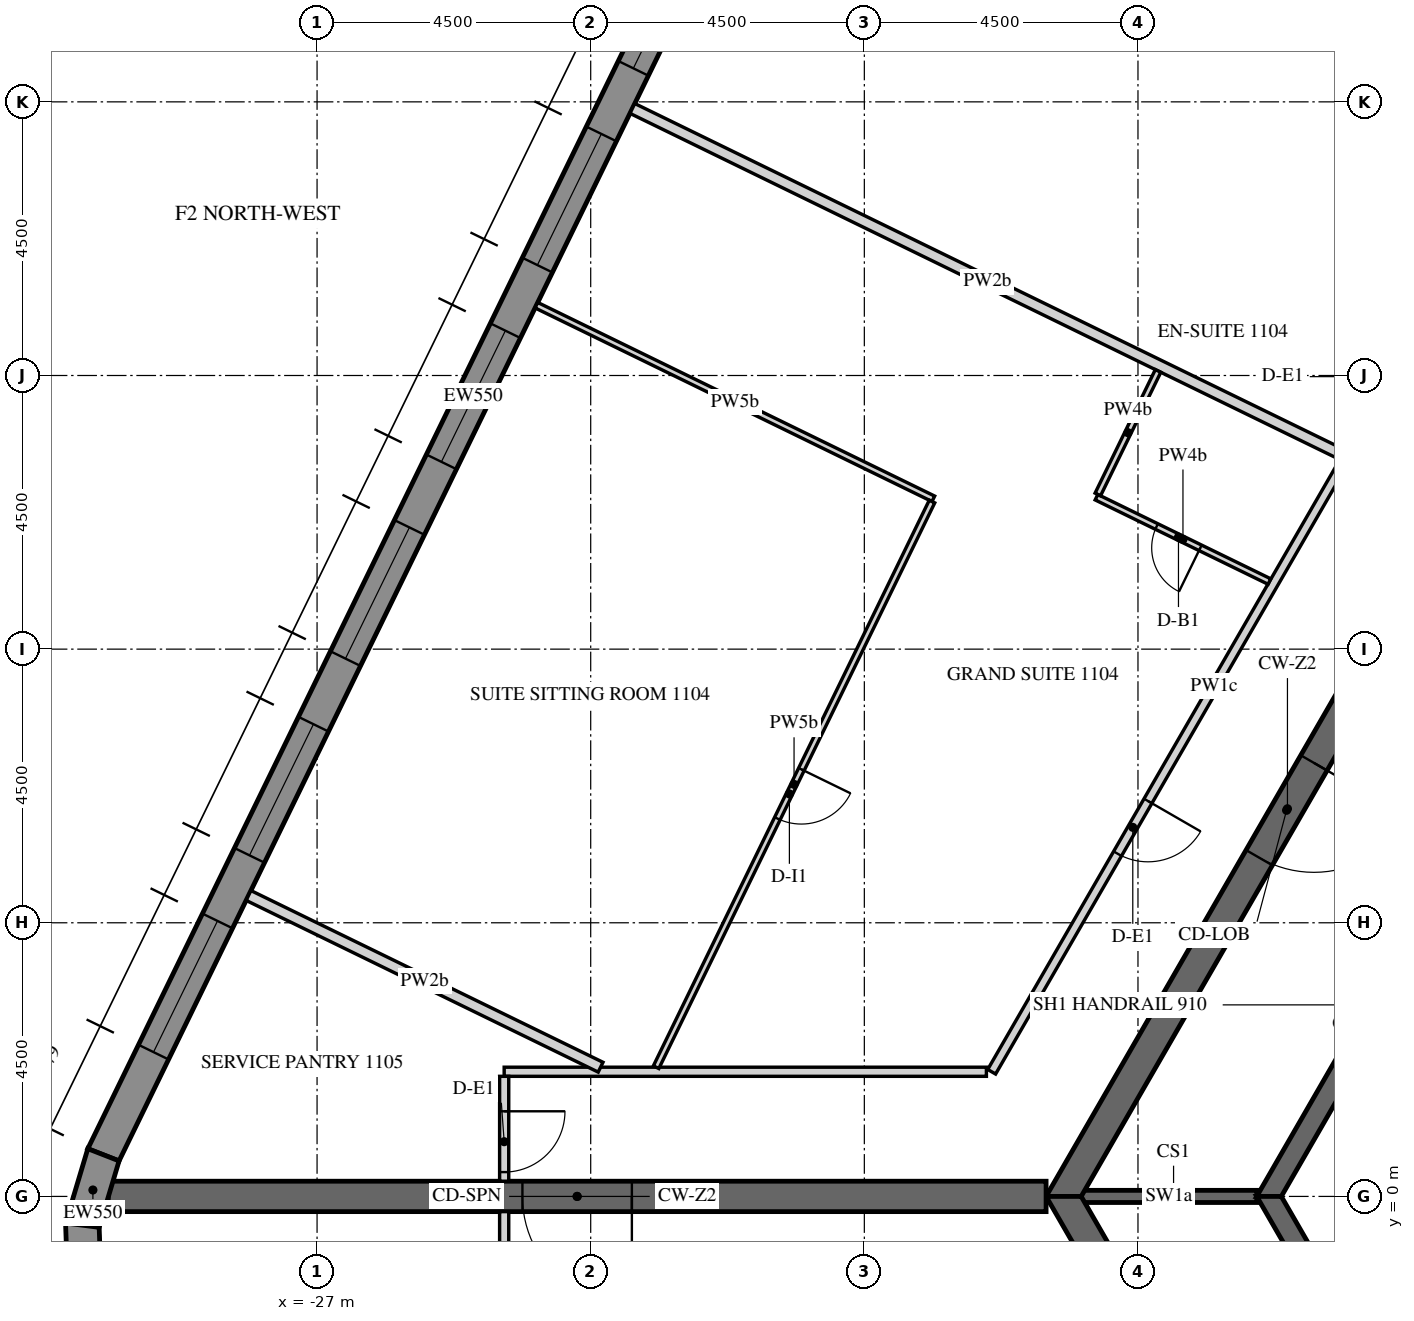
"""IFC4 building model, lengths in metres.
Left out: names, types, materials, properties, quantities, classifications, styles, units other than length and angle.
Written with IfcOpenShell. Run it as: python <this file> out.ifc"""

import sys

from ifc_helpers import new_model, si_unit, direction, frame, frame_2d, origin, place, context, subcontext, project, spatial, polyline, rectangle, outline, extrude, element, fill, save


model = new_model("IFC4")
c1 = context("Model", 3, precision=1e-05, world=origin(), true_north=direction((0.0, 1.0)))
c2 = subcontext(c1, "Body", "Model", "MODEL_VIEW")
j1 = project(units=[si_unit("LENGTHUNIT", "METRE"), si_unit("PLANEANGLEUNIT", "RADIAN")], contexts=[c1])
p1 = place(None, origin())
s1 = spatial("IfcSite", under=j1, at=p1, CompositionType="ELEMENT")
p2 = place(p1, origin())
s2 = spatial("IfcBuilding", under=s1, at=p2, CompositionType="ELEMENT")
p3 = place(p2, frame((0.0, 0.0, 156.6)))
s3 = spatial("IfcBuildingStorey", under=s2, at=p3, CompositionType="ELEMENT", Elevation=156.6)
p4 = place(p3, frame((-18.345, 25.633, -0.15), z_axis=(0.0, 0.0, 1.0), x_axis=(-0.43837181828, -0.898793718791, 0.0)))
e1 = element("IfcWall", 1, at=p4, inside=s3, PredefinedType="SOLIDWALL", context=c2, shape_type="SweptSolid", body=[
    extrude(outline(polyline([(-0.026, -0.275), (27.78, -0.275), (27.735, 0.275), (0.026, 0.275), (-0.026, -0.275)])), origin(), (0.0, 0.0, 1.0), 3.9),
])
p5 = place(p4, frame((1.879, 0.0, 1.05)))
e2 = element("IfcOpeningElement", 2, at=p5, cuts=e1, PredefinedType="OPENING", context=c2, shape_type="SweptSolid", body=[
    extrude(rectangle(XDim=2.4, YDim=2.4, at=frame_2d((1.2, 1.2))), frame((0.0, 0.285, 0.0), z_axis=(0.0, -1.0, 0.0), x_axis=(1.0, 0.0, 0.0)), (0.0, 0.0, 1.0), 0.57),
])
p6 = place(p4, frame((5.479, 0.0, 1.05)))
e3 = element("IfcOpeningElement", 3, at=p6, cuts=e1, PredefinedType="OPENING", context=c2, shape_type="SweptSolid", body=[
    extrude(rectangle(XDim=2.4, YDim=2.4, at=frame_2d((1.2, 1.2))), frame((0.0, 0.285, 0.0), z_axis=(0.0, -1.0, 0.0), x_axis=(1.0, 0.0, 0.0)), (0.0, 0.0, 1.0), 0.57),
])
p7 = place(p4, frame((9.079, 0.0, 1.05)))
e4 = element("IfcOpeningElement", 4, at=p7, cuts=e1, PredefinedType="OPENING", context=c2, shape_type="SweptSolid", body=[
    extrude(rectangle(XDim=2.4, YDim=2.4, at=frame_2d((1.2, 1.2))), frame((0.0, 0.285, 0.0), z_axis=(0.0, -1.0, 0.0), x_axis=(1.0, 0.0, 0.0)), (0.0, 0.0, 1.0), 0.57),
])
p8 = place(p4, frame((12.679, 0.0, 1.05)))
e5 = element("IfcOpeningElement", 5, at=p8, cuts=e1, PredefinedType="OPENING", context=c2, shape_type="SweptSolid", body=[
    extrude(rectangle(XDim=2.4, YDim=2.4, at=frame_2d((1.2, 1.2))), frame((0.0, 0.285, 0.0), z_axis=(0.0, -1.0, 0.0), x_axis=(1.0, 0.0, 0.0)), (0.0, 0.0, 1.0), 0.57),
])
p9 = place(p4, frame((16.279, 0.0, 1.05)))
e6 = element("IfcOpeningElement", 6, at=p9, cuts=e1, PredefinedType="OPENING", context=c2, shape_type="SweptSolid", body=[
    extrude(rectangle(XDim=2.4, YDim=2.4, at=frame_2d((1.2, 1.2))), frame((0.0, 0.285, 0.0), z_axis=(0.0, -1.0, 0.0), x_axis=(1.0, 0.0, 0.0)), (0.0, 0.0, 1.0), 0.57),
])
p10 = place(p4, frame((19.879, 0.0, 1.05)))
e7 = element("IfcOpeningElement", 7, at=p10, cuts=e1, PredefinedType="OPENING", context=c2, shape_type="SweptSolid", body=[
    extrude(rectangle(XDim=2.4, YDim=2.4, at=frame_2d((1.2, 1.2))), frame((0.0, 0.285, 0.0), z_axis=(0.0, -1.0, 0.0), x_axis=(1.0, 0.0, 0.0)), (0.0, 0.0, 1.0), 0.57),
])
p11 = place(p4, frame((23.479, 0.0, 1.05)))
e8 = element("IfcOpeningElement", 8, at=p11, cuts=e1, PredefinedType="OPENING", context=c2, shape_type="SweptSolid", body=[
    extrude(rectangle(XDim=2.4, YDim=2.4, at=frame_2d((1.2, 1.2))), frame((0.0, 0.285, 0.0), z_axis=(0.0, -1.0, 0.0), x_axis=(1.0, 0.0, 0.0)), (0.0, 0.0, 1.0), 0.57),
])
p12 = place(p3, frame((-30.513, 0.684, -0.15), z_axis=(0.0, 0.0, 1.0), x_axis=(-0.286736058109, -0.958009620505, 0.0)))
e9 = element("IfcWall", 9, at=p12, inside=s3, PredefinedType="SOLIDWALL", context=c2, shape_type="SweptSolid", body=[
    extrude(outline(polyline([(-0.022, -0.275), (1.253, -0.275), (1.163, 0.275), (0.022, 0.275), (-0.022, -0.275)])), origin(), (0.0, 0.0, 1.0), 3.9),
])
p13 = place(p3, frame((-30.86, -0.473, -0.15), z_axis=(0.0, 0.0, 1.0), x_axis=(0.03495638276, -0.999388838893, 0.0)))
e10 = element("IfcWall", 10, at=p13, inside=s3, PredefinedType="SOLIDWALL", context=c2, shape_type="SweptSolid", body=[
    extrude(outline(polyline([(-0.045, -0.275), (1.253, -0.275), (1.163, 0.275), (0.045, 0.275), (-0.045, -0.275)])), origin(), (0.0, 0.0, 1.0), 3.9),
])
p14 = place(p3, frame((-7.361, 12.75, -0.15), z_axis=(0.0, 0.0, 1.0), x_axis=(-0.50000571537, -0.866022103989, 0.0)))
e11 = element("IfcWall", 11, at=p14, inside=s3, PredefinedType="SHEAR", context=c2, shape_type="SweptSolid", body=[
    extrude(outline(polyline([(-0.144, -0.25), (14.867, -0.25), (14.578, 0.25), (0.144, 0.25), (-0.144, -0.25)])), origin(), (0.0, 0.0, 1.0), 3.9),
])
p15 = place(p14, frame((6.49, 0.0, 0.15)))
e12 = element("IfcOpeningElement", 12, at=p15, cuts=e11, PredefinedType="OPENING", context=c2, shape_type="SweptSolid", body=[
    extrude(rectangle(XDim=1.8, YDim=2.4, at=frame_2d((0.9, 1.2))), frame((0.0, 0.26, 0.0), z_axis=(0.0, -1.0, 0.0), x_axis=(1.0, 0.0, 0.0)), (0.0, 0.0, 1.0), 0.52),
])
p16 = place(p3, frame((-14.722, 0.0, -0.15), z_axis=(0.0, 0.0, 1.0), x_axis=(0.50000571537, -0.866022103989, 0.0)))
e13 = element("IfcWall", 13, at=p16, inside=s3, PredefinedType="SHEAR", context=c2, shape_type="SweptSolid", body=[
    extrude(outline(polyline([(-0.144, -0.25), (14.867, -0.25), (14.578, 0.25), (0.144, 0.25), (-0.144, -0.25)])), origin(), (0.0, 0.0, 1.0), 3.9),
])
p17 = place(p16, frame((6.432, 0.0, 0.15)))
e14 = element("IfcOpeningElement", 14, at=p17, cuts=e13, PredefinedType="OPENING", context=c2, shape_type="SweptSolid", body=[
    extrude(rectangle(XDim=1.8, YDim=2.4, at=frame_2d((0.9, 1.2))), frame((0.0, 0.26, 0.0), z_axis=(0.0, -1.0, 0.0), x_axis=(1.0, 0.0, 0.0)), (0.0, 0.0, 1.0), 0.52),
])
p18 = place(p3, frame((-15.011, 0.0, -0.15), z_axis=(0.0, 0.0, 1.0), x_axis=(-1.0, 0.0, 0.0)))
e15 = element("IfcWall", 15, at=p18, inside=s3, PredefinedType="SHEAR", context=c2, shape_type="SweptSolid", body=[
    extrude(rectangle(XDim=15.424, YDim=0.5, at=frame_2d((7.712, 0.0))), origin(), (0.0, 0.0, 1.0), 3.9),
])
p19 = place(p18, frame((6.812, 0.0, 0.15)))
e16 = element("IfcOpeningElement", 16, at=p19, cuts=e15, PredefinedType="OPENING", context=c2, shape_type="SweptSolid", body=[
    extrude(rectangle(XDim=1.8, YDim=2.4, at=frame_2d((0.9, 1.2))), frame((0.0, 0.26, 0.0), z_axis=(0.0, -1.0, 0.0), x_axis=(1.0, 0.0, 0.0)), (0.0, 0.0, 1.0), 0.52),
])
p20 = place(p3, frame((-5.673, 9.825, -0.15), z_axis=(0.0, 0.0, 1.0), x_axis=(-0.499995046907, -0.866028263435, 0.0)))
e17 = element("IfcWall", 17, at=p20, inside=s3, PredefinedType="SHEAR", context=c2, shape_type="SweptSolid", body=[
    extrude(outline(polyline([(-0.101, -0.175), (11.446, -0.175), (11.244, 0.175), (0.101, 0.175), (-0.101, -0.175)])), origin(), (0.0, 0.0, 1.0), 3.9),
])
p21 = place(p20, frame((4.801, 0.0, 0.15)))
e18 = element("IfcOpeningElement", 18, at=p21, cuts=e17, PredefinedType="OPENING", context=c2, shape_type="SweptSolid", body=[
    extrude(rectangle(XDim=1.8, YDim=2.4, at=frame_2d((0.9, 1.2))), frame((0.0, 0.185, 0.0), z_axis=(0.0, -1.0, 0.0), x_axis=(1.0, 0.0, 0.0)), (0.0, 0.0, 1.0), 0.37),
])
p22 = place(p3, frame((-11.345, 0.0, -0.15), z_axis=(0.0, 0.0, 1.0), x_axis=(0.499995046907, -0.866028263435, 0.0)))
e19 = element("IfcWall", 19, at=p22, inside=s3, PredefinedType="SHEAR", context=c2, shape_type="SweptSolid", body=[
    extrude(outline(polyline([(-0.101, -0.175), (11.446, -0.175), (11.244, 0.175), (0.101, 0.175), (-0.101, -0.175)])), origin(), (0.0, 0.0, 1.0), 3.9),
])
p23 = place(p22, frame((4.744, 0.0, 0.15)))
e20 = element("IfcOpeningElement", 20, at=p23, cuts=e19, PredefinedType="OPENING", context=c2, shape_type="SweptSolid", body=[
    extrude(rectangle(XDim=1.8, YDim=2.4, at=frame_2d((0.9, 1.2))), frame((0.0, 0.185, 0.0), z_axis=(0.0, -1.0, 0.0), x_axis=(1.0, 0.0, 0.0)), (0.0, 0.0, 1.0), 0.37),
])
p24 = place(p3, frame((-11.547, 0.0, -0.15), z_axis=(0.0, 0.0, 1.0), x_axis=(-1.0, 0.0, 0.0)))
e21 = element("IfcWall", 21, at=p24, inside=s3, PredefinedType="SHEAR", context=c2, shape_type="SweptSolid", body=[
    extrude(rectangle(XDim=2.887, YDim=0.2, at=frame_2d((1.443, 0.0))), origin(), (0.0, 0.0, 1.0), 3.9),
])
p25 = place(p3, frame((-8.588, 14.725, 0.0), z_axis=(0.0, 0.0, 1.0), x_axis=(-0.499996322767, -0.866027526826, 0.0)))
e22 = element("IfcWall", 22, at=p25, inside=s3, PredefinedType="PARTITIONING", context=c2, shape_type="SweptSolid", body=[
    extrude(rectangle(XDim=14.636, YDim=0.15, at=frame_2d((7.318, 0.0))), origin(), (0.0, 0.0, 1.0), 2.823),
])
p26 = place(p25, frame((0.936, 0.0, 0.0)))
e23 = element("IfcOpeningElement", 23, at=p26, cuts=e22, PredefinedType="OPENING", context=c2, shape_type="SweptSolid", body=[
    extrude(rectangle(XDim=1.0, YDim=2.1, at=frame_2d((0.5, 1.05))), frame((0.0, 0.085, 0.0), z_axis=(0.0, -1.0, 0.0), x_axis=(1.0, 0.0, 0.0)), (0.0, 0.0, 1.0), 0.17),
])
p27 = place(p25, frame((9.495, 0.0, 0.0)))
e24 = element("IfcOpeningElement", 24, at=p27, cuts=e22, PredefinedType="OPENING", context=c2, shape_type="SweptSolid", body=[
    extrude(rectangle(XDim=1.0, YDim=2.1, at=frame_2d((0.5, 1.05))), frame((0.0, 0.085, 0.0), z_axis=(0.0, -1.0, 0.0), x_axis=(1.0, 0.0, 0.0)), (0.0, 0.0, 1.0), 0.17),
])
p28 = place(p3, frame((-15.993, 2.05, 0.0), z_axis=(0.0, 0.0, 1.0), x_axis=(-1.0, 0.0, 0.0)))
e25 = element("IfcWall", 25, at=p28, inside=s3, PredefinedType="PARTITIONING", context=c2, shape_type="SweptSolid", body=[
    extrude(rectangle(XDim=7.93, YDim=0.15, at=frame_2d((3.965, 0.0))), origin(), (0.0, 0.0, 1.0), 2.823),
])
p29 = place(p3, frame((-23.923, 1.975, 0.0), z_axis=(0.0, 0.0, 1.0), x_axis=(0.0, -1.0, 0.0)))
e26 = element("IfcWall", 26, at=p29, inside=s3, PredefinedType="PARTITIONING", context=c2, shape_type="SweptSolid", body=[
    extrude(rectangle(XDim=1.725, YDim=0.15, at=frame_2d((0.863, 0.0))), origin(), (0.0, 0.0, 1.0), 2.823),
])
p30 = place(p29, frame((0.575, 0.0, 0.0)))
e27 = element("IfcOpeningElement", 27, at=p30, cuts=e26, PredefinedType="OPENING", context=c2, shape_type="SweptSolid", body=[
    extrude(rectangle(XDim=1.0, YDim=2.1, at=frame_2d((0.5, 1.05))), frame((0.0, 0.085, 0.0), z_axis=(0.0, -1.0, 0.0), x_axis=(1.0, 0.0, 0.0)), (0.0, 0.0, 1.0), 0.17),
])
p31 = place(p3, frame((-23.923, -0.25, 0.0), z_axis=(0.0, 0.0, 1.0), x_axis=(0.0, -1.0, 0.0)))
e28 = element("IfcWall", 28, at=p31, inside=s3, PredefinedType="PARTITIONING", context=c2, shape_type="SweptSolid", body=[
    extrude(rectangle(XDim=1.8, YDim=0.15, at=frame_2d((0.9, 0.0))), origin(), (0.0, 0.0, 1.0), 2.823),
])
p32 = place(p3, frame((-21.815, 17.892, 0.0), z_axis=(0.0, 0.0, 1.0), x_axis=(0.898798778742, -0.43836144371, 0.0)))
e29 = element("IfcWall", 29, at=p32, inside=s3, PredefinedType="PARTITIONING", context=c2, shape_type="SweptSolid", body=[
    extrude(rectangle(XDim=12.994, YDim=0.18, at=frame_2d((6.497, 0.0))), origin(), (0.0, 0.0, 1.0), 2.823),
])
p33 = place(p3, frame((-11.338, 10.112, 0.0), z_axis=(0.0, 0.0, 1.0), x_axis=(-0.898781792608, 0.438396269688, 0.0)))
e30 = element("IfcWall", 30, at=p33, inside=s3, PredefinedType="PARTITIONING", context=c2, shape_type="SweptSolid", body=[
    extrude(rectangle(XDim=3.164, YDim=0.1, at=frame_2d((1.582, 0.0))), origin(), (0.0, 0.0, 1.0), 2.823),
])
p34 = place(p33, frame((1.264, 0.0, 0.0)))
e31 = element("IfcOpeningElement", 31, at=p34, cuts=e30, PredefinedType="OPENING", context=c2, shape_type="SweptSolid", body=[
    extrude(rectangle(XDim=0.8, YDim=2.1, at=frame_2d((0.4, 1.05))), frame((0.0, 0.06, 0.0), z_axis=(0.0, -1.0, 0.0), x_axis=(1.0, 0.0, 0.0)), (0.0, 0.0, 1.0), 0.12),
])
p35 = place(p3, frame((-14.16, 11.544, 0.0), z_axis=(0.0, 0.0, 1.0), x_axis=(0.438376807268, 0.898791285477, 0.0)))
e32 = element("IfcWall", 32, at=p35, inside=s3, PredefinedType="PARTITIONING", context=c2, shape_type="SweptSolid", body=[
    extrude(rectangle(XDim=2.26, YDim=0.1, at=frame_2d((1.13, 0.0))), origin(), (0.0, 0.0, 1.0), 2.823),
])
p36 = place(p3, frame((-23.393, 14.656, 0.0), z_axis=(0.0, 0.0, 1.0), x_axis=(0.898794291179, -0.43837064471, 0.0)))
e33 = element("IfcWall", 33, at=p36, inside=s3, PredefinedType="PARTITIONING", context=c2, shape_type="SweptSolid", body=[
    extrude(rectangle(XDim=7.262, YDim=0.1, at=frame_2d((3.631, 0.0))), origin(), (0.0, 0.0, 1.0), 2.823),
])
p37 = place(p3, frame((-16.887, 11.427, 0.0), z_axis=(0.0, 0.0, 1.0), x_axis=(-0.438369721011, -0.898794741696, 0.0)))
e34 = element("IfcWall", 34, at=p37, inside=s3, PredefinedType="PARTITIONING", context=c2, shape_type="SweptSolid", body=[
    extrude(rectangle(XDim=10.35, YDim=0.1, at=frame_2d((5.175, 0.0))), origin(), (0.0, 0.0, 1.0), 2.823),
])
p38 = place(p37, frame((4.9, 0.0, 0.0)))
e35 = element("IfcOpeningElement", 35, at=p38, cuts=e34, PredefinedType="OPENING", context=c2, shape_type="SweptSolid", body=[
    extrude(rectangle(XDim=0.9, YDim=2.1, at=frame_2d((0.45, 1.05))), frame((0.0, 0.06, 0.0), z_axis=(0.0, -1.0, 0.0), x_axis=(1.0, 0.0, 0.0)), (0.0, 0.0, 1.0), 0.12),
])
p39 = place(p3, frame((-28.127, 4.949, 0.0), z_axis=(0.0, 0.0, 1.0), x_axis=(0.898795032868, -0.438369124017, 0.0)))
e36 = element("IfcWall", 36, at=p39, inside=s3, PredefinedType="PARTITIONING", context=c2, shape_type="SweptSolid", body=[
    extrude(rectangle(XDim=6.442, YDim=0.18, at=frame_2d((3.221, 0.0))), origin(), (0.0, 0.0, 1.0), 2.823),
])
p40 = place(p6, frame((0.0, 0.205, 0.0)))
e37 = element("IfcWindow", 37, at=p40, inside=s3, PartitioningType="DOUBLE_PANEL_VERTICAL", PredefinedType="WINDOW", context=c2, shape_type="SweptSolid", body=[
    extrude(rectangle(XDim=2.4, YDim=2.4, at=frame_2d((1.2, 1.2))), frame((0.0, 0.03, 0.0), z_axis=(0.0, -1.0, 0.0), x_axis=(1.0, 0.0, 0.0)), (0.0, 0.0, 1.0), 0.06),
])
fill(e3, e37)
p41 = place(p7, frame((0.0, 0.205, 0.0)))
e38 = element("IfcWindow", 38, at=p41, inside=s3, PartitioningType="DOUBLE_PANEL_VERTICAL", PredefinedType="WINDOW", context=c2, shape_type="SweptSolid", body=[
    extrude(rectangle(XDim=2.4, YDim=2.4, at=frame_2d((1.2, 1.2))), frame((0.0, 0.03, 0.0), z_axis=(0.0, -1.0, 0.0), x_axis=(1.0, 0.0, 0.0)), (0.0, 0.0, 1.0), 0.06),
])
fill(e4, e38)
p42 = place(p8, frame((0.0, 0.205, 0.0)))
e39 = element("IfcWindow", 39, at=p42, inside=s3, PartitioningType="DOUBLE_PANEL_VERTICAL", PredefinedType="WINDOW", context=c2, shape_type="SweptSolid", body=[
    extrude(rectangle(XDim=2.4, YDim=2.4, at=frame_2d((1.2, 1.2))), frame((0.0, 0.03, 0.0), z_axis=(0.0, -1.0, 0.0), x_axis=(1.0, 0.0, 0.0)), (0.0, 0.0, 1.0), 0.06),
])
fill(e5, e39)
p43 = place(p9, frame((0.0, 0.205, 0.0)))
e40 = element("IfcWindow", 40, at=p43, inside=s3, PartitioningType="DOUBLE_PANEL_VERTICAL", PredefinedType="WINDOW", context=c2, shape_type="SweptSolid", body=[
    extrude(rectangle(XDim=2.4, YDim=2.4, at=frame_2d((1.2, 1.2))), frame((0.0, 0.03, 0.0), z_axis=(0.0, -1.0, 0.0), x_axis=(1.0, 0.0, 0.0)), (0.0, 0.0, 1.0), 0.06),
])
fill(e6, e40)
p44 = place(p10, frame((0.0, 0.205, 0.0)))
e41 = element("IfcWindow", 41, at=p44, inside=s3, PartitioningType="DOUBLE_PANEL_VERTICAL", PredefinedType="WINDOW", context=c2, shape_type="SweptSolid", body=[
    extrude(rectangle(XDim=2.4, YDim=2.4, at=frame_2d((1.2, 1.2))), frame((0.0, 0.03, 0.0), z_axis=(0.0, -1.0, 0.0), x_axis=(1.0, 0.0, 0.0)), (0.0, 0.0, 1.0), 0.06),
])
fill(e7, e41)
p45 = place(p11, frame((0.0, 0.205, 0.0)))
e42 = element("IfcWindow", 42, at=p45, inside=s3, PartitioningType="DOUBLE_PANEL_VERTICAL", PredefinedType="WINDOW", context=c2, shape_type="SweptSolid", body=[
    extrude(rectangle(XDim=2.4, YDim=2.4, at=frame_2d((1.2, 1.2))), frame((0.0, 0.03, 0.0), z_axis=(0.0, -1.0, 0.0), x_axis=(1.0, 0.0, 0.0)), (0.0, 0.0, 1.0), 0.06),
])
fill(e8, e42)
p46 = place(p15, origin())
e43 = element("IfcDoor", 43, at=p46, inside=s3, OperationType="DOUBLE_DOOR_SINGLE_SWING", PredefinedType="DOOR", context=c2, shape_type="SweptSolid", body=[
    extrude(rectangle(XDim=1.8, YDim=2.4, at=frame_2d((0.9, 1.2))), frame((0.0, 0.025, 0.0), z_axis=(0.0, -1.0, 0.0), x_axis=(1.0, 0.0, 0.0)), (0.0, 0.0, 1.0), 0.05),
])
fill(e12, e43)
p47 = place(p19, origin())
e44 = element("IfcDoor", 44, at=p47, inside=s3, OperationType="DOUBLE_DOOR_SINGLE_SWING", PredefinedType="DOOR", context=c2, shape_type="SweptSolid", body=[
    extrude(rectangle(XDim=1.8, YDim=2.4, at=frame_2d((0.9, 1.2))), frame((0.0, 0.025, 0.0), z_axis=(0.0, -1.0, 0.0), x_axis=(1.0, 0.0, 0.0)), (0.0, 0.0, 1.0), 0.05),
])
fill(e16, e44)
p48 = place(p27, origin())
e45 = element("IfcDoor", 45, at=p48, inside=s3, OperationType="SINGLE_SWING_RIGHT", PredefinedType="DOOR", context=c2, shape_type="SweptSolid", body=[
    extrude(rectangle(XDim=1.0, YDim=2.1, at=frame_2d((0.5, 1.05))), frame((0.0, 0.025, 0.0), z_axis=(0.0, -1.0, 0.0), x_axis=(1.0, 0.0, 0.0)), (0.0, 0.0, 1.0), 0.05),
])
fill(e24, e45)
p49 = place(p34, origin())
e46 = element("IfcDoor", 46, at=p49, inside=s3, OperationType="SINGLE_SWING_LEFT", PredefinedType="DOOR", context=c2, shape_type="SweptSolid", body=[
    extrude(rectangle(XDim=0.8, YDim=2.1, at=frame_2d((0.4, 1.05))), frame((0.0, 0.025, 0.0), z_axis=(0.0, -1.0, 0.0), x_axis=(1.0, 0.0, 0.0)), (0.0, 0.0, 1.0), 0.05),
])
fill(e31, e46)
p50 = place(p38, origin())
e47 = element("IfcDoor", 47, at=p50, inside=s3, OperationType="SINGLE_SWING_LEFT", PredefinedType="DOOR", context=c2, shape_type="SweptSolid", body=[
    extrude(rectangle(XDim=0.9, YDim=2.1, at=frame_2d((0.45, 1.05))), frame((0.0, 0.025, 0.0), z_axis=(0.0, -1.0, 0.0), x_axis=(1.0, 0.0, 0.0)), (0.0, 0.0, 1.0), 0.05),
])
fill(e35, e47)
p51 = place(p30, origin())
e48 = element("IfcDoor", 48, at=p51, inside=s3, OperationType="SINGLE_SWING_LEFT", PredefinedType="DOOR", context=c2, shape_type="SweptSolid", body=[
    extrude(rectangle(XDim=1.0, YDim=2.1, at=frame_2d((0.5, 1.05))), frame((0.0, 0.025, 0.0), z_axis=(0.0, -1.0, 0.0), x_axis=(1.0, 0.0, 0.0)), (0.0, 0.0, 1.0), 0.05),
])
fill(e27, e48)
save(model, sys.argv[1])
